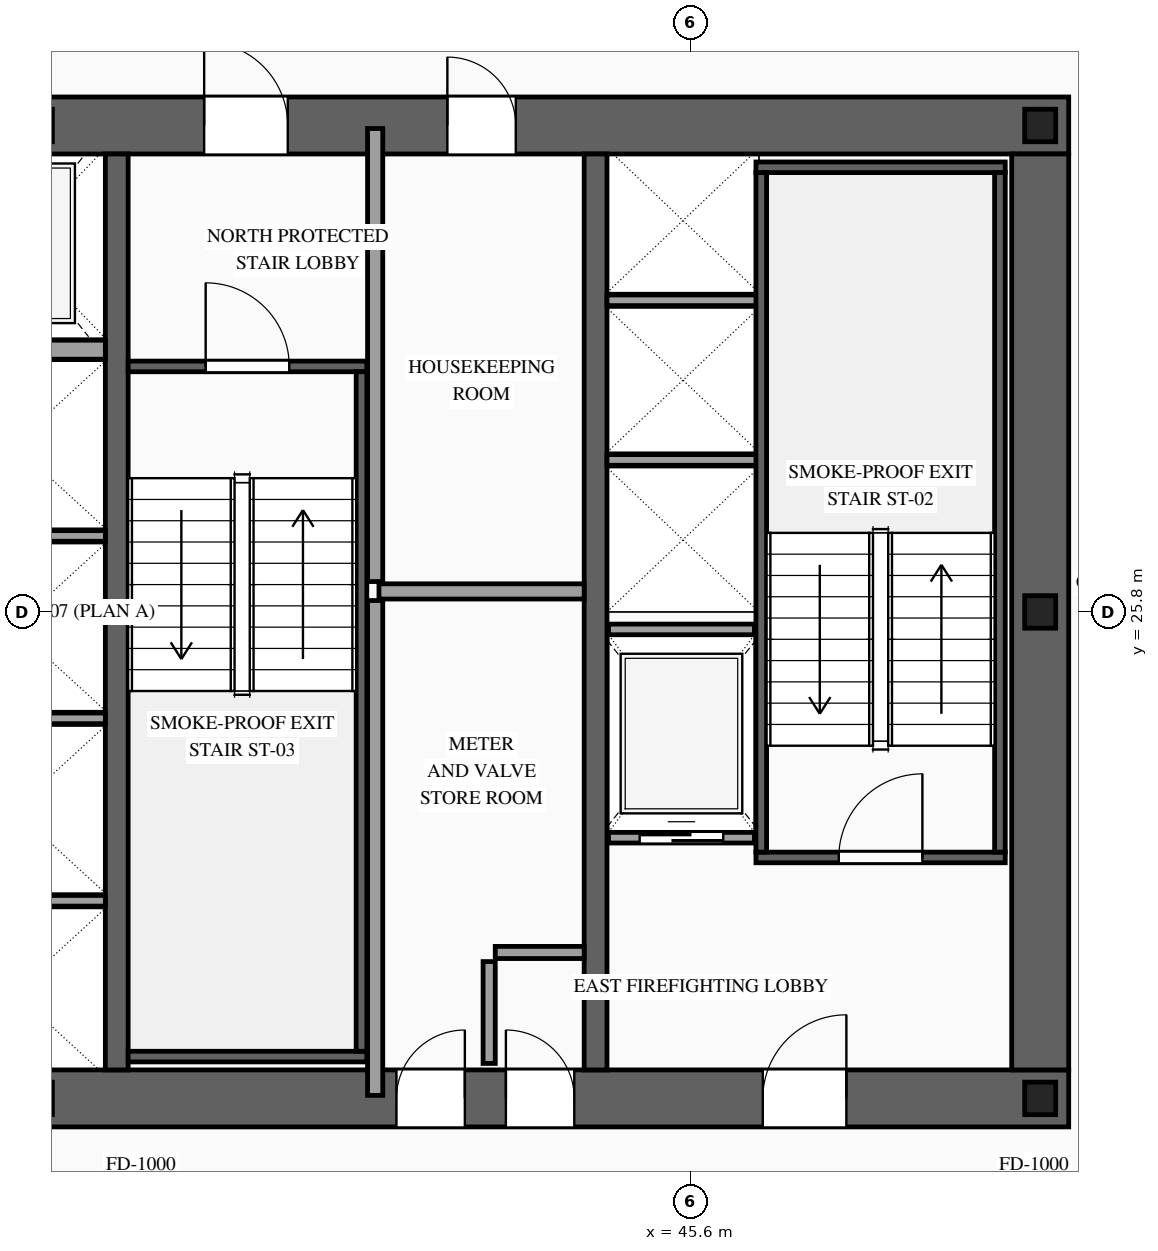
"""IFC4 building model, lengths in metres.
Left out: names, types, materials, properties, quantities, classifications, styles, units other than length and angle.
Written with IfcOpenShell. Run it as: python <this file> out.ifc"""

import sys

from ifc_helpers import new_model, si_unit, direction, frame, frame_2d, origin, origin_2d, place, context, subcontext, project, spatial, rectangle, i_section, extrude, source, transform, mapped, element, fill, save


model = new_model("IFC4")
c1 = context("Model", 3, precision=1e-05, world=origin(), true_north=direction((0.0, 1.0)))
c2 = subcontext(c1, "Body", "Model", "MODEL_VIEW")
j1 = project(units=[si_unit("LENGTHUNIT", "METRE"), si_unit("PLANEANGLEUNIT", "RADIAN")], contexts=[c1])
p1 = place(None, origin())
s1 = spatial("IfcSite", under=j1, at=p1, CompositionType="ELEMENT")
p2 = place(p1, origin())
s2 = spatial("IfcBuilding", under=s1, at=p2, CompositionType="ELEMENT")
p3 = place(p2, frame((0.0, 0.0, 93.8)))
s3 = spatial("IfcBuildingStorey", under=s2, at=p3, CompositionType="ELEMENT", Elevation=93.8)
p4 = place(p3, frame((23.425, 19.4, 0.0), z_axis=(0.0, 0.0, 1.0), x_axis=(1.0, 0.0, 0.0)))
e1 = element("IfcWall", 1, at=p4, inside=s3, PredefinedType="SHEAR", context=c2, shape_type="SweptSolid", body=[
    extrude(rectangle(XDim=27.15, YDim=0.75, at=frame_2d((13.575, 0.0))), origin(), (0.0, 0.0, 1.0), 3.6),
])
p5 = place(p4, frame((2.025, 0.0, 0.0)))
e2 = element("IfcOpeningElement", 2, at=p5, cuts=e1, PredefinedType="OPENING", context=c2, shape_type="SweptSolid", body=[
    extrude(rectangle(XDim=1.1, YDim=2.2, at=frame_2d((0.55, 1.1))), frame((0.0, 0.39, 0.0), z_axis=(0.0, -1.0, 0.0), x_axis=(1.0, 0.0, 0.0)), (0.0, 0.0, 1.0), 0.78),
])
p6 = place(p4, frame((9.925, 0.0, 0.0)))
e3 = element("IfcOpeningElement", 3, at=p6, cuts=e1, PredefinedType="OPENING", context=c2, shape_type="SweptSolid", body=[
    extrude(rectangle(XDim=1.1, YDim=2.2, at=frame_2d((0.55, 1.1))), frame((0.0, 0.39, 0.0), z_axis=(0.0, -1.0, 0.0), x_axis=(1.0, 0.0, 0.0)), (0.0, 0.0, 1.0), 0.78),
])
p7 = place(p4, frame((23.125, 0.0, 0.0)))
e4 = element("IfcOpeningElement", 4, at=p7, cuts=e1, PredefinedType="OPENING", context=c2, shape_type="SweptSolid", body=[
    extrude(rectangle(XDim=1.1, YDim=2.2, at=frame_2d((0.55, 1.1))), frame((0.0, 0.39, 0.0), z_axis=(0.0, -1.0, 0.0), x_axis=(1.0, 0.0, 0.0)), (0.0, 0.0, 1.0), 0.78),
])
p8 = place(p4, frame((19.745, 0.0, 0.0)))
e5 = element("IfcOpeningElement", 5, at=p8, cuts=e1, PredefinedType="OPENING", context=c2, shape_type="SweptSolid", body=[
    extrude(rectangle(XDim=0.9, YDim=2.15, at=frame_2d((0.45, 1.075))), frame((0.0, 0.39, 0.0), z_axis=(0.0, -1.0, 0.0), x_axis=(1.0, 0.0, 0.0)), (0.0, 0.0, 1.0), 0.78),
])
p9 = place(p4, frame((18.305, 0.0, 0.0)))
e6 = element("IfcOpeningElement", 6, at=p9, cuts=e1, PredefinedType="OPENING", context=c2, shape_type="SweptSolid", body=[
    extrude(rectangle(XDim=0.9, YDim=2.15, at=frame_2d((0.45, 1.075))), frame((0.0, 0.39, 0.0), z_axis=(0.0, -1.0, 0.0), x_axis=(1.0, 0.0, 0.0)), (0.0, 0.0, 1.0), 0.78),
])
p10 = place(p3, frame((23.425, 32.2, 0.0), z_axis=(0.0, 0.0, 1.0), x_axis=(1.0, 0.0, 0.0)))
e7 = element("IfcWall", 7, at=p10, inside=s3, PredefinedType="SHEAR", context=c2, shape_type="SweptSolid", body=[
    extrude(rectangle(XDim=27.15, YDim=0.75, at=frame_2d((13.575, 0.0))), origin(), (0.0, 0.0, 1.0), 3.6),
])
p11 = place(p10, frame((4.645, 0.0, 0.0)))
e8 = element("IfcOpeningElement", 8, at=p11, cuts=e7, PredefinedType="OPENING", context=c2, shape_type="SweptSolid", body=[
    extrude(rectangle(XDim=0.9, YDim=2.15, at=frame_2d((0.45, 1.075))), frame((0.0, 0.39, 0.0), z_axis=(0.0, -1.0, 0.0), x_axis=(1.0, 0.0, 0.0)), (0.0, 0.0, 1.0), 0.78),
])
p12 = place(p10, frame((9.925, 0.0, 0.0)))
e9 = element("IfcOpeningElement", 9, at=p12, cuts=e7, PredefinedType="OPENING", context=c2, shape_type="SweptSolid", body=[
    extrude(rectangle(XDim=1.1, YDim=2.2, at=frame_2d((0.55, 1.1))), frame((0.0, 0.39, 0.0), z_axis=(0.0, -1.0, 0.0), x_axis=(1.0, 0.0, 0.0)), (0.0, 0.0, 1.0), 0.78),
])
p13 = place(p10, frame((15.775, 0.0, 0.0)))
e10 = element("IfcOpeningElement", 10, at=p13, cuts=e7, PredefinedType="OPENING", context=c2, shape_type="SweptSolid", body=[
    extrude(rectangle(XDim=1.1, YDim=2.2, at=frame_2d((0.55, 1.1))), frame((0.0, 0.39, 0.0), z_axis=(0.0, -1.0, 0.0), x_axis=(1.0, 0.0, 0.0)), (0.0, 0.0, 1.0), 0.78),
])
p14 = place(p10, frame((18.975, 0.0, 0.0)))
e11 = element("IfcOpeningElement", 11, at=p14, cuts=e7, PredefinedType="OPENING", context=c2, shape_type="SweptSolid", body=[
    extrude(rectangle(XDim=0.9, YDim=2.15, at=frame_2d((0.45, 1.075))), frame((0.0, 0.39, 0.0), z_axis=(0.0, -1.0, 0.0), x_axis=(1.0, 0.0, 0.0)), (0.0, 0.0, 1.0), 0.78),
])
m1 = source(origin(), c2, "Body", "SweptSolid", [
    extrude(rectangle(XDim=12.05, YDim=0.75, at=frame_2d((6.025, 0.0))), origin(), (0.0, 0.0, 1.0), 3.6),
])
p15 = place(p3, frame((50.2, 19.775, 0.0), z_axis=(0.0, 0.0, 1.0), x_axis=(0.0, 1.0, 0.0)))
e12 = element("IfcWall", 12, at=p15, inside=s3, PredefinedType="SHEAR", context=c2, shape_type="MappedRepresentation", body=[
    mapped(m1, transform((0.0, 0.0, 0.0), scale=1.0)),
])
m2 = source(origin(), c2, "Body", "SweptSolid", [
    extrude(rectangle(XDim=12.05, YDim=0.3, at=frame_2d((6.025, 0.0))), origin(), (0.0, 0.0, 1.0), 3.6),
])
for number, where, z_axis, x_axis in (
    (13, (38.05, 19.775, 0.0), (0.0, 0.0, 1.0), (0.0, 1.0, 0.0)),
    (14, (44.35, 19.775, 0.0), (0.0, 0.0, 1.0), (0.0, 1.0, 0.0)),
):
    element("IfcWall", number, at=place(p3, frame(where, z_axis=z_axis, x_axis=x_axis)), inside=s3, PredefinedType="SOLIDWALL", context=c2, shape_type="MappedRepresentation", body=[
        mapped(m2, transform((0.0, 0.0, 0.0), scale=1.0)),
    ])
m3 = source(origin(), c2, "Body", "SweptSolid", [
    extrude(i_section(OverallWidth=0.407, OverallDepth=0.428, WebThickness=0.02, FlangeThickness=0.035, at=origin_2d()), origin(), (0.0, 0.0, 1.0), 3.6),
])
for number, where, z_axis, x_axis in (
    (15, (37.0, 19.4, 0.0), (0.0, 0.0, 1.0), (1.0, 0.0, 0.0)),
    (16, (50.2, 19.4, 0.0), (0.0, 0.0, 1.0), (1.0, 0.0, 0.0)),
    (17, (50.2, 25.8, 0.0), (0.0, 0.0, 1.0), (1.0, 0.0, 0.0)),
    (18, (37.0, 32.2, 0.0), (0.0, 0.0, 1.0), (1.0, 0.0, 0.0)),
    (19, (50.2, 32.2, 0.0), (0.0, 0.0, 1.0), (1.0, 0.0, 0.0)),
):
    element("IfcColumn", number, at=place(p3, frame(where, z_axis=z_axis, x_axis=x_axis)), inside=s3, PredefinedType="COLUMN", context=c2, shape_type="MappedRepresentation", body=[
        mapped(m3, transform((0.0, 0.0, 0.0), scale=1.0)),
    ])
p16 = place(p3, frame((44.52, 22.83, 0.0), z_axis=(0.0, 0.0, 1.0), x_axis=(1.0, 0.0, 0.0)))
e20 = element("IfcWall", 20, at=p16, inside=s3, PredefinedType="SOLIDWALL", context=c2, shape_type="SweptSolid", body=[
    extrude(rectangle(XDim=1.92, YDim=0.14, at=frame_2d((0.96, 0.0))), origin(), (0.0, 0.0, 1.0), 3.38),
])
p17 = place(p16, frame((0.41, 0.0, 0.0)))
e21 = element("IfcOpeningElement", 21, at=p17, cuts=e20, PredefinedType="OPENING", context=c2, shape_type="SweptSolid", body=[
    extrude(rectangle(XDim=1.1, YDim=2.2, at=frame_2d((0.55, 1.1))), frame((0.0, 0.085, 0.0), z_axis=(0.0, -1.0, 0.0), x_axis=(1.0, 0.0, 0.0)), (0.0, 0.0, 1.0), 0.17),
])
m4 = source(origin(), c2, "Body", "SweptSolid", [
    extrude(rectangle(XDim=1.92, YDim=0.14, at=frame_2d((0.96, 0.0))), origin(), (0.0, 0.0, 1.0), 3.38),
])
p18 = place(p3, frame((44.52, 25.57, 0.0), z_axis=(0.0, 0.0, 1.0), x_axis=(1.0, 0.0, 0.0)))
e22 = element("IfcWall", 22, at=p18, inside=s3, PredefinedType="SOLIDWALL", context=c2, shape_type="MappedRepresentation", body=[
    mapped(m4, transform((0.0, 0.0, 0.0), scale=1.0)),
])
m5 = source(origin(), c2, "Body", "SweptSolid", [
    extrude(rectangle(XDim=2.4, YDim=0.14, at=frame_2d((1.2, 0.0))), origin(), (0.0, 0.0, 1.0), 3.38),
])
for number, where, z_axis, x_axis in (
    (23, (35.5, 22.0, 0.0), (0.0, 0.0, 1.0), (1.0, 0.0, 0.0)),
    (24, (35.5, 24.4, 0.0), (0.0, 0.0, 1.0), (1.0, 0.0, 0.0)),
    (25, (35.5, 26.8, 0.0), (0.0, 0.0, 1.0), (1.0, 0.0, 0.0)),
):
    element("IfcWall", number, at=place(p3, frame(where, z_axis=z_axis, x_axis=x_axis)), inside=s3, PredefinedType="SOLIDWALL", context=c2, shape_type="MappedRepresentation", body=[
        mapped(m5, transform((0.0, 0.0, 0.0), scale=1.0)),
    ])
m6 = source(origin(), c2, "Body", "SweptSolid", [
    extrude(rectangle(XDim=2.4, YDim=0.25, at=frame_2d((1.2, 0.0))), origin(), (0.0, 0.0, 1.0), 3.38),
])
p19 = place(p3, frame((35.5, 29.25, 0.0), z_axis=(0.0, 0.0, 1.0), x_axis=(1.0, 0.0, 0.0)))
e26 = element("IfcWall", 26, at=p19, inside=s3, PredefinedType="SOLIDWALL", context=c2, shape_type="MappedRepresentation", body=[
    mapped(m6, transform((0.0, 0.0, 0.0), scale=1.0)),
])
m7 = source(origin(), c2, "Body", "SweptSolid", [
    extrude(rectangle(XDim=2.0, YDim=0.14, at=frame_2d((1.0, 0.0))), origin(), (0.0, 0.0, 1.0), 3.38),
])
for number, where, z_axis, x_axis in (
    (27, (44.5, 27.8, 0.0), (0.0, 0.0, 1.0), (1.0, 0.0, 0.0)),
    (28, (44.5, 29.9, 0.0), (0.0, 0.0, 1.0), (1.0, 0.0, 0.0)),
):
    element("IfcWall", number, at=place(p3, frame(where, z_axis=z_axis, x_axis=x_axis)), inside=s3, PredefinedType="SOLIDWALL", context=c2, shape_type="MappedRepresentation", body=[
        mapped(m7, transform((0.0, 0.0, 0.0), scale=1.0)),
    ])
p20 = place(p3, frame((46.46, 22.57, 0.0), z_axis=(0.0, 0.0, 1.0), x_axis=(1.0, 0.0, 0.0)))
e29 = element("IfcWall", 29, at=p20, inside=s3, PredefinedType="SOLIDWALL", context=c2, shape_type="SweptSolid", body=[
    extrude(rectangle(XDim=3.28, YDim=0.14, at=frame_2d((1.64, 0.0))), origin(), (0.0, 0.0, 1.0), 3.38),
])
p21 = place(p20, frame((1.09, 0.0, 0.0)))
e30 = element("IfcOpeningElement", 30, at=p21, cuts=e29, PredefinedType="OPENING", context=c2, shape_type="SweptSolid", body=[
    extrude(rectangle(XDim=1.1, YDim=2.2, at=frame_2d((0.55, 1.1))), frame((0.0, 0.085, 0.0), z_axis=(0.0, -1.0, 0.0), x_axis=(1.0, 0.0, 0.0)), (0.0, 0.0, 1.0), 0.17),
])
m8 = source(origin(), c2, "Body", "SweptSolid", [
    extrude(rectangle(XDim=3.28, YDim=0.14, at=frame_2d((1.64, 0.0))), origin(), (0.0, 0.0, 1.0), 3.38),
])
p22 = place(p3, frame((46.46, 31.65, 0.0), z_axis=(0.0, 0.0, 1.0), x_axis=(1.0, 0.0, 0.0)))
e31 = element("IfcWall", 31, at=p22, inside=s3, PredefinedType="SOLIDWALL", context=c2, shape_type="MappedRepresentation", body=[
    mapped(m8, transform((0.0, 0.0, 0.0), scale=1.0)),
])
m9 = source(origin(), c2, "Body", "SweptSolid", [
    extrude(rectangle(XDim=8.94, YDim=0.14, at=frame_2d((4.47, 0.0))), origin(), (0.0, 0.0, 1.0), 3.38),
])
for number, where, z_axis, x_axis in (
    (32, (46.53, 22.64, 0.0), (0.0, 0.0, 1.0), (0.0, 1.0, 0.0)),
    (33, (49.67, 22.64, 0.0), (0.0, 0.0, 1.0), (0.0, 1.0, 0.0)),
):
    element("IfcWall", number, at=place(p3, frame(where, z_axis=z_axis, x_axis=x_axis)), inside=s3, PredefinedType="SOLIDWALL", context=c2, shape_type="MappedRepresentation", body=[
        mapped(m9, transform((0.0, 0.0, 0.0), scale=1.0)),
    ])
p23 = place(p3, frame((38.2, 29.03, 0.0), z_axis=(0.0, 0.0, 1.0), x_axis=(1.0, 0.0, 0.0)))
e34 = element("IfcWall", 34, at=p23, inside=s3, PredefinedType="SOLIDWALL", context=c2, shape_type="SweptSolid", body=[
    extrude(rectangle(XDim=3.14, YDim=0.14, at=frame_2d((1.57, 0.0))), origin(), (0.0, 0.0, 1.0), 3.38),
])
p24 = place(p23, frame((1.02, 0.0, 0.0)))
e35 = element("IfcOpeningElement", 35, at=p24, cuts=e34, PredefinedType="OPENING", context=c2, shape_type="SweptSolid", body=[
    extrude(rectangle(XDim=1.1, YDim=2.2, at=frame_2d((0.55, 1.1))), frame((0.0, 0.085, 0.0), z_axis=(0.0, -1.0, 0.0), x_axis=(1.0, 0.0, 0.0)), (0.0, 0.0, 1.0), 0.17),
])
m10 = source(origin(), c2, "Body", "SweptSolid", [
    extrude(rectangle(XDim=3.14, YDim=0.14, at=frame_2d((1.57, 0.0))), origin(), (0.0, 0.0, 1.0), 3.38),
])
p25 = place(p3, frame((38.2, 19.95, 0.0), z_axis=(0.0, 0.0, 1.0), x_axis=(1.0, 0.0, 0.0)))
e36 = element("IfcWall", 36, at=p25, inside=s3, PredefinedType="SOLIDWALL", context=c2, shape_type="MappedRepresentation", body=[
    mapped(m10, transform((0.0, 0.0, 0.0), scale=1.0)),
])
m11 = source(origin(), c2, "Body", "SweptSolid", [
    extrude(rectangle(XDim=8.94, YDim=0.14, at=frame_2d((4.47, 0.0))), origin(), (0.0, 0.0, 1.0), 3.38),
])
p26 = place(p3, frame((41.27, 20.02, 0.0), z_axis=(0.0, 0.0, 1.0), x_axis=(0.0, 1.0, 0.0)))
e37 = element("IfcWall", 37, at=p26, inside=s3, PredefinedType="SOLIDWALL", context=c2, shape_type="MappedRepresentation", body=[
    mapped(m11, transform((0.0, 0.0, 0.0), scale=1.0)),
])
m12 = source(origin(), c2, "Body", "SweptSolid", [
    extrude(rectangle(XDim=1.34, YDim=0.16, at=frame_2d((0.67, 0.0))), origin(), (0.0, 0.0, 1.0), 3.38),
])
p27 = place(p3, frame((42.95, 19.86, 0.0), z_axis=(0.0, 0.0, 1.0), x_axis=(0.0, 1.0, 0.0)))
e38 = element("IfcWall", 38, at=p27, inside=s3, PredefinedType="PARTITIONING", context=c2, shape_type="MappedRepresentation", body=[
    mapped(m12, transform((0.0, 0.0, 0.0), scale=1.0)),
])
m13 = source(origin(), c2, "Body", "SweptSolid", [
    extrude(rectangle(XDim=1.17, YDim=0.16, at=frame_2d((0.585, 0.0))), origin(), (0.0, 0.0, 1.0), 3.38),
])
p28 = place(p3, frame((43.03, 21.32, 0.0), z_axis=(0.0, 0.0, 1.0), x_axis=(1.0, 0.0, 0.0)))
e39 = element("IfcWall", 39, at=p28, inside=s3, PredefinedType="PARTITIONING", context=c2, shape_type="MappedRepresentation", body=[
    mapped(m13, transform((0.0, 0.0, 0.0), scale=1.0)),
])
m14 = source(origin(), c2, "Body", "SweptSolid", [
    extrude(rectangle(XDim=6.51, YDim=0.2, at=frame_2d((3.255, 0.0))), origin(), (0.0, 0.0, 1.0), 3.38),
])
p29 = place(p3, frame((41.45, 19.44, 0.0), z_axis=(0.0, 0.0, 1.0), x_axis=(0.0, 1.0, 0.0)))
e40 = element("IfcWall", 40, at=p29, inside=s3, PredefinedType="PARTITIONING", context=c2, shape_type="MappedRepresentation", body=[
    mapped(m14, transform((0.0, 0.0, 0.0), scale=1.0)),
])
m15 = source(origin(), c2, "Body", "SweptSolid", [
    extrude(rectangle(XDim=2.7, YDim=0.2, at=frame_2d((1.35, 0.0))), origin(), (0.0, 0.0, 1.0), 3.38),
])
p30 = place(p3, frame((41.5, 26.07, 0.0), z_axis=(0.0, 0.0, 1.0), x_axis=(1.0, 0.0, 0.0)))
e41 = element("IfcWall", 41, at=p30, inside=s3, PredefinedType="PARTITIONING", context=c2, shape_type="MappedRepresentation", body=[
    mapped(m15, transform((0.0, 0.0, 0.0), scale=1.0)),
])
m16 = source(origin(), c2, "Body", "SweptSolid", [
    extrude(rectangle(XDim=5.96, YDim=0.2, at=frame_2d((2.98, 0.0))), origin(), (0.0, 0.0, 1.0), 3.38),
])
p31 = place(p3, frame((41.45, 26.2, 0.0), z_axis=(0.0, 0.0, 1.0), x_axis=(0.0, 1.0, 0.0)))
e42 = element("IfcWall", 42, at=p31, inside=s3, PredefinedType="PARTITIONING", context=c2, shape_type="MappedRepresentation", body=[
    mapped(m16, transform((0.0, 0.0, 0.0), scale=1.0)),
])
m17 = source(origin(), c2, "Body", "SweptSolid", [
    extrude(rectangle(XDim=1.1, YDim=2.2, at=frame_2d((0.55, 1.1))), frame((0.0, 0.025, 0.0), z_axis=(0.0, -1.0, 0.0), x_axis=(1.0, 0.0, 0.0)), (0.0, 0.0, 1.0), 0.05),
])
p32 = place(p17, origin())
e43 = element("IfcDoor", 43, at=p32, inside=s3, OperationType="SLIDING_TO_RIGHT", PredefinedType="DOOR", context=c2, shape_type="MappedRepresentation", body=[
    mapped(m17, transform((0.0, 0.0, 0.0), scale=1.0)),
])
fill(e21, e43)
m18 = source(origin(), c2, "Body", "SweptSolid", [
    extrude(rectangle(XDim=1.1, YDim=2.2, at=frame_2d((0.55, 1.1))), frame((0.0, 0.025, 0.0), z_axis=(0.0, -1.0, 0.0), x_axis=(1.0, 0.0, 0.0)), (0.0, 0.0, 1.0), 0.05),
])
p33 = place(p21, origin())
e44 = element("IfcDoor", 44, at=p33, inside=s3, OperationType="SINGLE_SWING_RIGHT", PredefinedType="DOOR", context=c2, shape_type="MappedRepresentation", body=[
    mapped(m18, transform((0.0, 0.0, 0.0), scale=1.0)),
])
fill(e30, e44)
p34 = place(p24, origin())
e45 = element("IfcDoor", 45, at=p34, inside=s3, OperationType="SINGLE_SWING_LEFT", PredefinedType="DOOR", context=c2, shape_type="MappedRepresentation", body=[
    mapped(m18, transform((0.0, 0.0, 0.0), scale=1.0)),
])
fill(e35, e45)
p35 = place(p7, origin())
e46 = element("IfcDoor", 46, at=p35, inside=s3, OperationType="SINGLE_SWING_RIGHT", PredefinedType="DOOR", context=c2, shape_type="MappedRepresentation", body=[
    mapped(m18, transform((0.0, 0.0, 0.0), scale=1.0)),
])
fill(e4, e46)
p36 = place(p13, origin())
e47 = element("IfcDoor", 47, at=p36, inside=s3, OperationType="SINGLE_SWING_LEFT", PredefinedType="DOOR", context=c2, shape_type="MappedRepresentation", body=[
    mapped(m18, transform((0.0, 0.0, 0.0), scale=1.0)),
])
fill(e10, e47)
m19 = source(origin(), c2, "Body", "SweptSolid", [
    extrude(rectangle(XDim=0.9, YDim=2.15, at=frame_2d((0.45, 1.075))), frame((0.0, 0.025, 0.0), z_axis=(0.0, -1.0, 0.0), x_axis=(1.0, 0.0, 0.0)), (0.0, 0.0, 1.0), 0.05),
])
p37 = place(p8, origin())
e48 = element("IfcDoor", 48, at=p37, inside=s3, OperationType="SINGLE_SWING_LEFT", PredefinedType="DOOR", context=c2, shape_type="MappedRepresentation", body=[
    mapped(m19, transform((0.0, 0.0, 0.0), scale=1.0)),
])
fill(e5, e48)
p38 = place(p9, origin())
e49 = element("IfcDoor", 49, at=p38, inside=s3, OperationType="SINGLE_SWING_RIGHT", PredefinedType="DOOR", context=c2, shape_type="MappedRepresentation", body=[
    mapped(m19, transform((0.0, 0.0, 0.0), scale=1.0)),
])
fill(e6, e49)
p39 = place(p14, origin())
e50 = element("IfcDoor", 50, at=p39, inside=s3, OperationType="SINGLE_SWING_LEFT", PredefinedType="DOOR", context=c2, shape_type="MappedRepresentation", body=[
    mapped(m19, transform((0.0, 0.0, 0.0), scale=1.0)),
])
fill(e11, e50)
save(model, sys.argv[1])
